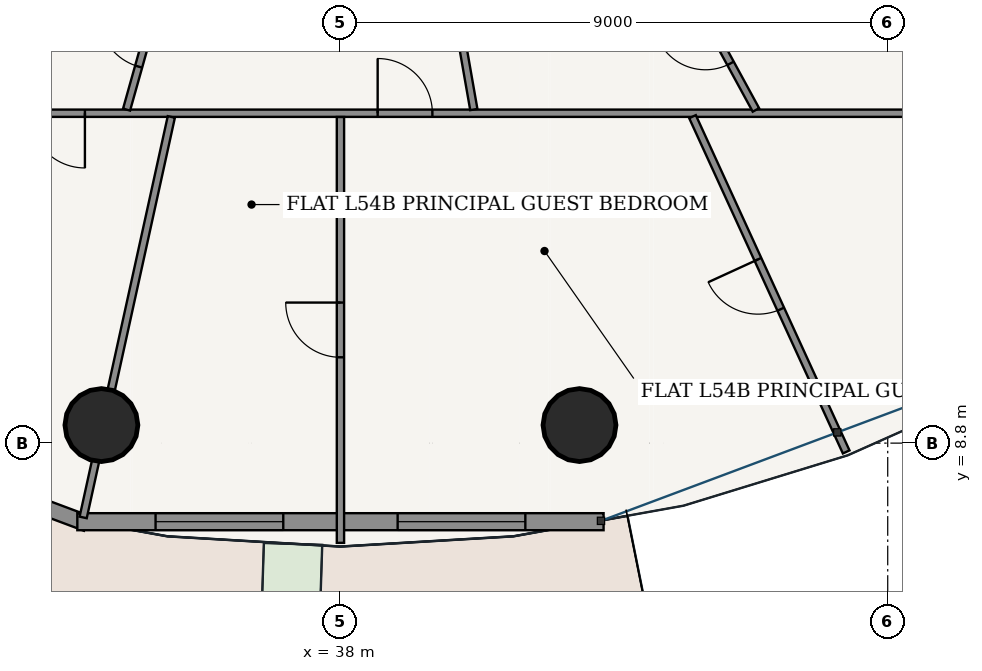
"""IFC4 building model, lengths in metres.
Left out: names, types, materials, properties, quantities, classifications, styles, units other than length and angle.
Written with IfcOpenShell. Run it as: python <this file> out.ifc"""

import sys

from ifc_helpers import new_model, si_unit, direction, frame, frame_2d, origin, origin_2d, place, context, subcontext, project, spatial, rectangle, hollow_circle, extrude, source, transform, mapped, element, fill, save


model = new_model("IFC4")
c1 = context("Model", 3, precision=1e-05, world=origin(), true_north=direction((-0.2419218956, 0.970295726276)))
c2 = subcontext(c1, "Body", "Model", "MODEL_VIEW")
j1 = project(units=[si_unit("LENGTHUNIT", "METRE"), si_unit("PLANEANGLEUNIT", "RADIAN")], contexts=[c1])
p1 = place(None, origin())
s1 = spatial("IfcSite", under=j1, at=p1, CompositionType="ELEMENT")
p2 = place(p1, origin())
s2 = spatial("IfcBuilding", under=s1, at=p2, CompositionType="ELEMENT")
p3 = place(p2, frame((0.0, 0.0, 206.0)))
s3 = spatial("IfcBuildingStorey", under=s2, at=p3, CompositionType="ELEMENT", Elevation=206.0)
for number, where, z_axis, x_axis in (
    (1, (34.069, 9.097, 0.0), (0.0, 0.0, 1.0), (1.0, 0.0, 0.0)),
    (2, (41.931, 9.097, 0.0), (0.0, 0.0, 1.0), (1.0, 0.0, 0.0)),
):
    element("IfcColumn", number, at=place(p3, frame(where, z_axis=z_axis, x_axis=x_axis)), inside=s3, PredefinedType="COLUMN", context=c2, shape_type="SweptSolid", body=[
        extrude(hollow_circle(Radius=0.6, WallThickness=0.038, at=origin_2d()), origin(), (0.0, 0.0, 1.0), 3.7),
    ])
p4 = place(p3, frame((25.83, 10.473, 0.0), z_axis=(0.0, 0.0, 1.0), x_axis=(0.936556918375, -0.350515532672, 0.0)))
e3 = element("IfcWall", 3, at=p4, inside=s3, PredefinedType="SOLIDWALL", context=c2, shape_type="SweptSolid", body=[
    extrude(rectangle(XDim=8.539, YDim=0.26, at=frame_2d((4.27, 0.0))), origin(), (0.0, 0.0, 1.0), 3.435),
])
p5 = place(p4, frame((3.594, 0.0, 0.0)))
e4 = element("IfcOpeningElement", 4, at=p5, cuts=e3, PredefinedType="OPENING", context=c2, shape_type="SweptSolid", body=[
    extrude(rectangle(XDim=1.35, YDim=2.2, at=frame_2d((0.675, 1.1))), frame((0.0, 0.14, 0.0), z_axis=(0.0, -1.0, 0.0), x_axis=(1.0, 0.0, 0.0)), (0.0, 0.0, 1.0), 0.28),
])
p6 = place(p3, frame((33.673, 7.508, 0.0), z_axis=(0.0, 0.0, 1.0), x_axis=(1.0, 0.0, 0.0)))
e5 = element("IfcWall", 5, at=p6, inside=s3, PredefinedType="SOLIDWALL", context=c2, shape_type="SweptSolid", body=[
    extrude(rectangle(XDim=8.654, YDim=0.28, at=frame_2d((4.327, 0.0))), origin(), (0.0, 0.0, 1.0), 3.435),
])
p7 = place(p6, frame((1.287, 0.0, 0.85)))
e6 = element("IfcOpeningElement", 6, at=p7, cuts=e5, PredefinedType="OPENING", context=c2, shape_type="SweptSolid", body=[
    extrude(rectangle(XDim=2.1, YDim=1.95, at=frame_2d((1.05, 0.975))), frame((0.0, 0.15, 0.0), z_axis=(0.0, -1.0, 0.0), x_axis=(1.0, 0.0, 0.0)), (0.0, 0.0, 1.0), 0.3),
])
p8 = place(p6, frame((5.268, 0.0, 0.85)))
e7 = element("IfcOpeningElement", 7, at=p8, cuts=e5, PredefinedType="OPENING", context=c2, shape_type="SweptSolid", body=[
    extrude(rectangle(XDim=2.1, YDim=1.95, at=frame_2d((1.05, 0.975))), frame((0.0, 0.15, 0.0), z_axis=(0.0, -1.0, 0.0), x_axis=(1.0, 0.0, 0.0)), (0.0, 0.0, 1.0), 0.3),
])
p9 = place(p3, frame((51.575, 14.225, 0.0), z_axis=(0.0, 0.0, 1.0), x_axis=(-1.0, 0.0, 0.0)))
e8 = element("IfcWall", 8, at=p9, inside=s3, PredefinedType="PARTITIONING", context=c2, shape_type="SweptSolid", body=[
    extrude(rectangle(XDim=19.675, YDim=0.12, at=frame_2d((9.837, 0.0))), origin(), (0.0, 0.0, 1.0), 2.951),
])
p10 = place(p9, frame((3.083, 0.0, 0.0)))
e9 = element("IfcOpeningElement", 9, at=p10, cuts=e8, PredefinedType="OPENING", context=c2, shape_type="SweptSolid", body=[
    extrude(rectangle(XDim=0.9, YDim=2.15, at=frame_2d((0.45, 1.075))), frame((0.0, 0.07, 0.0), z_axis=(0.0, -1.0, 0.0), x_axis=(1.0, 0.0, 0.0)), (0.0, 0.0, 1.0), 0.14),
])
p11 = place(p9, frame((12.063, 0.0, 0.0)))
e10 = element("IfcOpeningElement", 10, at=p11, cuts=e8, PredefinedType="OPENING", context=c2, shape_type="SweptSolid", body=[
    extrude(rectangle(XDim=0.9, YDim=2.15, at=frame_2d((0.45, 1.075))), frame((0.0, 0.07, 0.0), z_axis=(0.0, -1.0, 0.0), x_axis=(1.0, 0.0, 0.0)), (0.0, 0.0, 1.0), 0.14),
])
p12 = place(p9, frame((17.777, 0.0, 0.0)))
e11 = element("IfcOpeningElement", 11, at=p12, cuts=e8, PredefinedType="OPENING", context=c2, shape_type="SweptSolid", body=[
    extrude(rectangle(XDim=0.9, YDim=2.15, at=frame_2d((0.45, 1.075))), frame((0.0, 0.07, 0.0), z_axis=(0.0, -1.0, 0.0), x_axis=(1.0, 0.0, 0.0)), (0.0, 0.0, 1.0), 0.14),
])
p13 = place(p3, frame((35.219, 14.165, 0.0), z_axis=(0.0, 0.0, 1.0), x_axis=(-0.214959845337, -0.976622887758, 0.0)))
e12 = element("IfcWall", 12, at=p13, inside=s3, PredefinedType="PARTITIONING", context=c2, shape_type="SweptSolid", body=[
    extrude(rectangle(XDim=6.744, YDim=0.12, at=frame_2d((3.372, 0.0))), origin(), (0.0, 0.0, 1.0), 2.951),
])
p14 = place(p3, frame((38.0, 14.163, 0.0), z_axis=(0.0, 0.0, 1.0), x_axis=(0.0, -1.0, 0.0)))
e13 = element("IfcWall", 13, at=p14, inside=s3, PredefinedType="PARTITIONING", context=c2, shape_type="SweptSolid", body=[
    extrude(rectangle(XDim=7.003, YDim=0.12, at=frame_2d((3.501, 0.0))), origin(), (0.0, 0.0, 1.0), 2.951),
])
p15 = place(p14, frame((3.052, 0.0, 0.0)))
e14 = element("IfcOpeningElement", 14, at=p15, cuts=e13, PredefinedType="OPENING", context=c2, shape_type="SweptSolid", body=[
    extrude(rectangle(XDim=0.9, YDim=2.15, at=frame_2d((0.45, 1.075))), frame((0.0, 0.07, 0.0), z_axis=(0.0, -1.0, 0.0), x_axis=(1.0, 0.0, 0.0)), (0.0, 0.0, 1.0), 0.14),
])
p16 = place(p3, frame((43.79, 14.169, 0.0), z_axis=(0.0, 0.0, 1.0), x_axis=(0.416687974363, -0.909049576218, 0.0)))
e15 = element("IfcWall", 15, at=p16, inside=s3, PredefinedType="PARTITIONING", context=c2, shape_type="SweptSolid", body=[
    extrude(rectangle(XDim=6.065, YDim=0.12, at=frame_2d((3.033, 0.0))), origin(), (0.0, 0.0, 1.0), 2.951),
])
p17 = place(p16, frame((2.583, 0.0, 0.0)))
e16 = element("IfcOpeningElement", 16, at=p17, cuts=e15, PredefinedType="OPENING", context=c2, shape_type="SweptSolid", body=[
    extrude(rectangle(XDim=0.9, YDim=2.15, at=frame_2d((0.45, 1.075))), frame((0.0, 0.07, 0.0), z_axis=(0.0, -1.0, 0.0), x_axis=(1.0, 0.0, 0.0)), (0.0, 0.0, 1.0), 0.14),
])
p18 = place(p3, frame((35.124, 16.565, 0.0), z_axis=(0.0, 0.0, 1.0), x_axis=(-0.270566477163, -0.962701293982, 0.0)))
e17 = element("IfcWall", 17, at=p18, inside=s3, PredefinedType="PARTITIONING", context=c2, shape_type="SweptSolid", body=[
    extrude(rectangle(XDim=2.369, YDim=0.12, at=frame_2d((1.184, 0.0))), origin(), (0.0, 0.0, 1.0), 3.435),
])
p19 = place(p18, frame((0.734, 0.0, 0.0)))
e18 = element("IfcOpeningElement", 18, at=p19, cuts=e17, PredefinedType="OPENING", context=c2, shape_type="SweptSolid", body=[
    extrude(rectangle(XDim=0.9, YDim=2.15, at=frame_2d((0.45, 1.075))), frame((0.0, 0.07, 0.0), z_axis=(0.0, -1.0, 0.0), x_axis=(1.0, 0.0, 0.0)), (0.0, 0.0, 1.0), 0.14),
])
p20 = place(p3, frame((39.794, 16.565, 0.0), z_axis=(0.0, 0.0, 1.0), x_axis=(0.172641422295, -0.984984740647, 0.0)))
e19 = element("IfcWall", 19, at=p20, inside=s3, PredefinedType="PARTITIONING", context=c2, shape_type="SweptSolid", body=[
    extrude(rectangle(XDim=2.313, YDim=0.12, at=frame_2d((1.157, 0.0))), origin(), (0.0, 0.0, 1.0), 3.435),
])
p21 = place(p3, frame((43.585, 16.565, 0.0), z_axis=(0.0, 0.0, 1.0), x_axis=(0.479068920965, -0.877777288932, 0.0)))
e20 = element("IfcWall", 20, at=p21, inside=s3, PredefinedType="PARTITIONING", context=c2, shape_type="SweptSolid", body=[
    extrude(rectangle(XDim=2.604, YDim=0.12, at=frame_2d((1.302, 0.0))), origin(), (0.0, 0.0, 1.0), 3.11),
])
p22 = place(p21, frame((0.872, 0.0, 0.0)))
e21 = element("IfcOpeningElement", 21, at=p22, cuts=e20, PredefinedType="OPENING", context=c2, shape_type="SweptSolid", body=[
    extrude(rectangle(XDim=0.86, YDim=2.15, at=frame_2d((0.43, 1.075))), frame((0.0, 0.07, 0.0), z_axis=(0.0, -1.0, 0.0), x_axis=(1.0, 0.0, 0.0)), (0.0, 0.0, 1.0), 0.14),
])
m1 = source(origin(), c2, "Body", "SweptSolid", [
    extrude(rectangle(XDim=2.1, YDim=1.95, at=frame_2d((1.05, 0.975))), frame((0.0, 0.03, 0.0), z_axis=(0.0, -1.0, 0.0), x_axis=(1.0, 0.0, 0.0)), (0.0, 0.0, 1.0), 0.06),
])
p23 = place(p7, origin())
e22 = element("IfcWindow", 22, at=p23, inside=s3, PartitioningType="SINGLE_PANEL", PredefinedType="WINDOW", context=c2, shape_type="MappedRepresentation", body=[
    mapped(m1, transform((0.0, 0.0, 0.0), scale=1.0)),
])
fill(e6, e22)
p24 = place(p8, origin())
e23 = element("IfcWindow", 23, at=p24, inside=s3, PartitioningType="SINGLE_PANEL", PredefinedType="WINDOW", context=c2, shape_type="MappedRepresentation", body=[
    mapped(m1, transform((0.0, 0.0, 0.0), scale=1.0)),
])
fill(e7, e23)
m2 = source(origin(), c2, "Body", "SweptSolid", [
    extrude(rectangle(XDim=0.86, YDim=2.15, at=frame_2d((0.43, 1.075))), frame((0.0, 0.025, 0.0), z_axis=(0.0, -1.0, 0.0), x_axis=(1.0, 0.0, 0.0)), (0.0, 0.0, 1.0), 0.05),
])
p25 = place(p22, frame((0.86, 0.0, 0.0), z_axis=(0.0, 0.0, 1.0), x_axis=(-1.0, 0.0, 0.0)))
e24 = element("IfcDoor", 24, at=p25, inside=s3, OperationType="SINGLE_SWING_RIGHT", PredefinedType="DOOR", context=c2, shape_type="MappedRepresentation", body=[
    mapped(m2, transform((0.0, 0.0, 0.0), scale=1.0)),
])
fill(e21, e24)
m3 = source(origin(), c2, "Body", "SweptSolid", [
    extrude(rectangle(XDim=0.9, YDim=2.15, at=frame_2d((0.45, 1.075))), frame((0.0, 0.025, 0.0), z_axis=(0.0, -1.0, 0.0), x_axis=(1.0, 0.0, 0.0)), (0.0, 0.0, 1.0), 0.05),
])
p26 = place(p17, frame((0.9, 0.0, 0.0), z_axis=(0.0, 0.0, 1.0), x_axis=(-1.0, 0.0, 0.0)))
e25 = element("IfcDoor", 25, at=p26, inside=s3, OperationType="SINGLE_SWING_RIGHT", PredefinedType="DOOR", context=c2, shape_type="MappedRepresentation", body=[
    mapped(m3, transform((0.0, 0.0, 0.0), scale=1.0)),
])
fill(e16, e25)
p27 = place(p11, frame((0.9, 0.0, 0.0), z_axis=(0.0, 0.0, 1.0), x_axis=(-1.0, 0.0, 0.0)))
e26 = element("IfcDoor", 26, at=p27, inside=s3, OperationType="SINGLE_SWING_LEFT", PredefinedType="DOOR", context=c2, shape_type="MappedRepresentation", body=[
    mapped(m3, transform((0.0, 0.0, 0.0), scale=1.0)),
])
fill(e10, e26)
p28 = place(p19, frame((0.9, 0.0, 0.0), z_axis=(0.0, 0.0, 1.0), x_axis=(-1.0, 0.0, 0.0)))
e27 = element("IfcDoor", 27, at=p28, inside=s3, OperationType="SINGLE_SWING_RIGHT", PredefinedType="DOOR", context=c2, shape_type="MappedRepresentation", body=[
    mapped(m3, transform((0.0, 0.0, 0.0), scale=1.0)),
])
fill(e18, e27)
p29 = place(p12, origin())
e28 = element("IfcDoor", 28, at=p29, inside=s3, OperationType="SINGLE_SWING_LEFT", PredefinedType="DOOR", context=c2, shape_type="MappedRepresentation", body=[
    mapped(m3, transform((0.0, 0.0, 0.0), scale=1.0)),
])
fill(e11, e28)
p30 = place(p15, frame((0.9, 0.0, 0.0), z_axis=(0.0, 0.0, 1.0), x_axis=(-1.0, 0.0, 0.0)))
e29 = element("IfcDoor", 29, at=p30, inside=s3, OperationType="SINGLE_SWING_RIGHT", PredefinedType="DOOR", context=c2, shape_type="MappedRepresentation", body=[
    mapped(m3, transform((0.0, 0.0, 0.0), scale=1.0)),
])
fill(e14, e29)
save(model, sys.argv[1])
